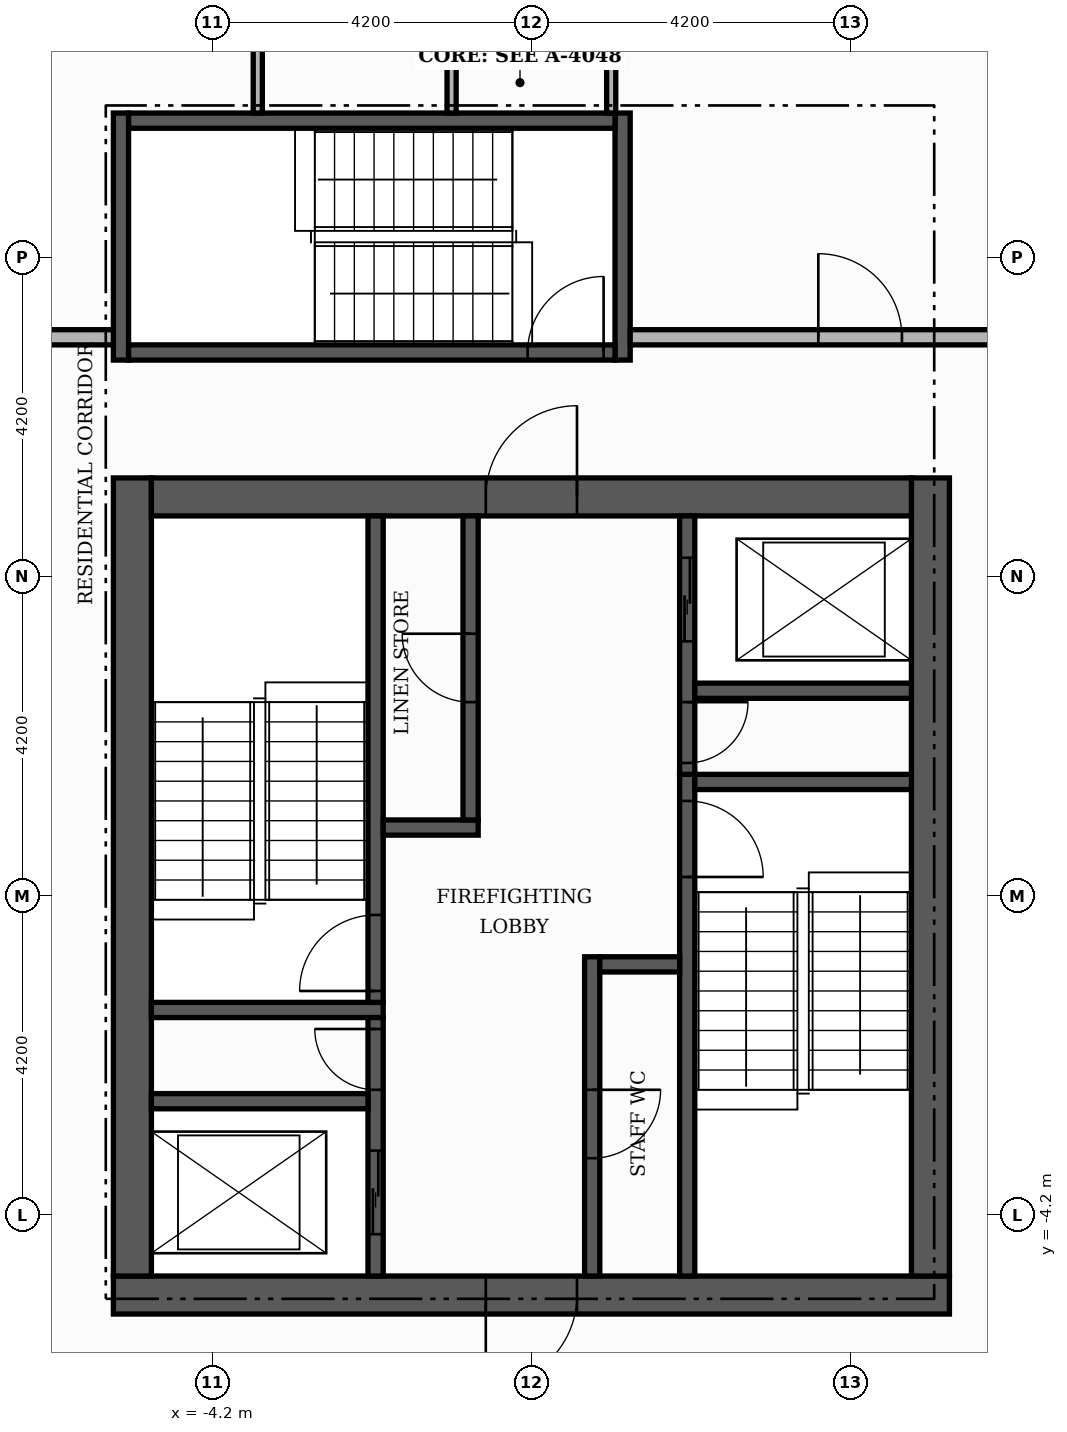
"""IFC4 building model, lengths in metres.
Left out: names, types, materials, properties, quantities, classifications, styles, units other than length and angle.
Written with IfcOpenShell. Run it as: python <this file> out.ifc"""

import sys

from ifc_helpers import new_model, si_unit, direction, frame, frame_2d, origin, place, context, subcontext, project, spatial, rectangle, extrude, element, fill, save


model = new_model("IFC4")
c1 = context("Model", 3, precision=1e-05, world=origin(), true_north=direction((0.0, 1.0)))
c2 = subcontext(c1, "Body", "Model", "MODEL_VIEW")
j1 = project(units=[si_unit("LENGTHUNIT", "METRE"), si_unit("PLANEANGLEUNIT", "RADIAN")], contexts=[c1])
p1 = place(None, origin())
s1 = spatial("IfcSite", under=j1, at=p1, CompositionType="ELEMENT")
p2 = place(p1, origin())
s2 = spatial("IfcBuilding", under=s1, at=p2, CompositionType="ELEMENT")
p3 = place(p2, frame((0.0, 0.0, 296.7)))
s3 = spatial("IfcBuildingStorey", under=s2, at=p3, CompositionType="ELEMENT", Elevation=296.7)
p4 = place(p3, frame((-5.5, -5.25, 0.0), z_axis=(0.0, 0.0, 1.0), x_axis=(1.0, 0.0, 0.0)))
e1 = element("IfcWall", 1, at=p4, inside=s3, PredefinedType="SHEAR", context=c2, shape_type="SweptSolid", body=[
    extrude(rectangle(XDim=11.0, YDim=0.5, at=frame_2d((5.5, 0.0))), origin(), (0.0, 0.0, 1.0), 3.55),
])
p5 = place(p4, frame((4.9, 0.0, 0.0)))
e2 = element("IfcOpeningElement", 2, at=p5, cuts=e1, PredefinedType="OPENING", context=c2, shape_type="SweptSolid", body=[
    extrude(rectangle(XDim=1.2, YDim=2.1, at=frame_2d((0.6, 1.05))), frame((0.0, 0.26, 0.0), z_axis=(0.0, -1.0, 0.0), x_axis=(1.0, 0.0, 0.0)), (0.0, 0.0, 1.0), 0.52),
])
for number, where, z_axis, x_axis in (
    (3, (-5.25, -5.0, 0.0), (0.0, 0.0, 1.0), (0.0, 1.0, 0.0)),
    (4, (5.25, -5.0, 0.0), (0.0, 0.0, 1.0), (0.0, 1.0, 0.0)),
):
    element("IfcWall", number, at=place(p3, frame(where, z_axis=z_axis, x_axis=x_axis)), inside=s3, PredefinedType="SHEAR", context=c2, shape_type="SweptSolid", body=[
        extrude(rectangle(XDim=10.5, YDim=0.5, at=frame_2d((5.25, 0.0))), origin(), (0.0, 0.0, 1.0), 3.55),
    ])
p6 = place(p3, frame((-5.0, 5.25, 0.0), z_axis=(0.0, 0.0, 1.0), x_axis=(1.0, 0.0, 0.0)))
e5 = element("IfcWall", 5, at=p6, inside=s3, PredefinedType="SHEAR", context=c2, shape_type="SweptSolid", body=[
    extrude(rectangle(XDim=10.0, YDim=0.5, at=frame_2d((5.0, 0.0))), origin(), (0.0, 0.0, 1.0), 3.55),
])
p7 = place(p6, frame((4.4, 0.0, 0.0)))
e6 = element("IfcOpeningElement", 6, at=p7, cuts=e5, PredefinedType="OPENING", context=c2, shape_type="SweptSolid", body=[
    extrude(rectangle(XDim=1.2, YDim=2.1, at=frame_2d((0.6, 1.05))), frame((0.0, 0.26, 0.0), z_axis=(0.0, -1.0, 0.0), x_axis=(1.0, 0.0, 0.0)), (0.0, 0.0, 1.0), 0.52),
])
p8 = place(p3, frame((2.05, -5.0, 0.0), z_axis=(0.0, 0.0, 1.0), x_axis=(0.0, 1.0, 0.0)))
e7 = element("IfcWall", 7, at=p8, inside=s3, PredefinedType="SHEAR", context=c2, shape_type="SweptSolid", body=[
    extrude(rectangle(XDim=6.6, YDim=0.2, at=frame_2d((3.3, 0.0))), origin(), (0.0, 0.0, 1.0), 3.55),
])
p9 = place(p8, frame((5.25, 0.0, 0.0)))
e8 = element("IfcOpeningElement", 8, at=p9, cuts=e7, PredefinedType="OPENING", context=c2, shape_type="SweptSolid", body=[
    extrude(rectangle(XDim=1.0, YDim=2.1, at=frame_2d((0.5, 1.05))), frame((0.0, 0.11, 0.0), z_axis=(0.0, -1.0, 0.0), x_axis=(1.0, 0.0, 0.0)), (0.0, 0.0, 1.0), 0.22),
])
p10 = place(p3, frame((-5.0, -1.5, 0.0), z_axis=(0.0, 0.0, 1.0), x_axis=(1.0, 0.0, 0.0)))
e9 = element("IfcWall", 9, at=p10, inside=s3, PredefinedType="SHEAR", context=c2, shape_type="SweptSolid", body=[
    extrude(rectangle(XDim=3.05, YDim=0.2, at=frame_2d((1.525, 0.0))), origin(), (0.0, 0.0, 1.0), 3.55),
])
p11 = place(p3, frame((-2.05, -1.4, 0.0), z_axis=(0.0, 0.0, 1.0), x_axis=(0.0, 1.0, 0.0)))
e10 = element("IfcWall", 10, at=p11, inside=s3, PredefinedType="SHEAR", context=c2, shape_type="SweptSolid", body=[
    extrude(rectangle(XDim=6.4, YDim=0.2, at=frame_2d((3.2, 0.0))), origin(), (0.0, 0.0, 1.0), 3.55),
])
p12 = place(p11, frame((0.15, 0.0, 0.0)))
e11 = element("IfcOpeningElement", 11, at=p12, cuts=e10, PredefinedType="OPENING", context=c2, shape_type="SweptSolid", body=[
    extrude(rectangle(XDim=1.0, YDim=2.1, at=frame_2d((0.5, 1.05))), frame((0.0, 0.11, 0.0), z_axis=(0.0, -1.0, 0.0), x_axis=(1.0, 0.0, 0.0)), (0.0, 0.0, 1.0), 0.22),
])
p13 = place(p3, frame((2.15, 1.5, 0.0), z_axis=(0.0, 0.0, 1.0), x_axis=(1.0, 0.0, 0.0)))
e12 = element("IfcWall", 12, at=p13, inside=s3, PredefinedType="SHEAR", context=c2, shape_type="SweptSolid", body=[
    extrude(rectangle(XDim=2.85, YDim=0.2, at=frame_2d((1.425, 0.0))), origin(), (0.0, 0.0, 1.0), 3.55),
])
p14 = place(p3, frame((-2.05, -5.0, 0.0), z_axis=(0.0, 0.0, 1.0), x_axis=(0.0, 1.0, 0.0)))
e13 = element("IfcWall", 13, at=p14, inside=s3, PredefinedType="SHEAR", context=c2, shape_type="SweptSolid", body=[
    extrude(rectangle(XDim=3.4, YDim=0.2, at=frame_2d((1.7, 0.0))), origin(), (0.0, 0.0, 1.0), 3.55),
])
p15 = place(p14, frame((0.55, 0.0, 0.0)))
e14 = element("IfcOpeningElement", 14, at=p15, cuts=e13, PredefinedType="OPENING", context=c2, shape_type="SweptSolid", body=[
    extrude(rectangle(XDim=1.1, YDim=2.1, at=frame_2d((0.55, 1.05))), frame((0.0, 0.11, 0.0), z_axis=(0.0, -1.0, 0.0), x_axis=(1.0, 0.0, 0.0)), (0.0, 0.0, 1.0), 0.22),
])
p16 = place(p14, frame((2.45, 0.0, 0.0)))
e15 = element("IfcOpeningElement", 15, at=p16, cuts=e13, PredefinedType="OPENING", context=c2, shape_type="SweptSolid", body=[
    extrude(rectangle(XDim=0.8, YDim=2.1, at=frame_2d((0.4, 1.05))), frame((0.0, 0.11, 0.0), z_axis=(0.0, -1.0, 0.0), x_axis=(1.0, 0.0, 0.0)), (0.0, 0.0, 1.0), 0.22),
])
p17 = place(p3, frame((0.8, -5.0, 0.0), z_axis=(0.0, 0.0, 1.0), x_axis=(0.0, 1.0, 0.0)))
e16 = element("IfcWall", 16, at=p17, inside=s3, PredefinedType="SHEAR", context=c2, shape_type="SweptSolid", body=[
    extrude(rectangle(XDim=4.2, YDim=0.2, at=frame_2d((2.1, 0.0))), origin(), (0.0, 0.0, 1.0), 3.55),
])
p18 = place(p17, frame((1.55, 0.0, 0.0)))
e17 = element("IfcOpeningElement", 17, at=p18, cuts=e16, PredefinedType="OPENING", context=c2, shape_type="SweptSolid", body=[
    extrude(rectangle(XDim=0.9, YDim=2.1, at=frame_2d((0.45, 1.05))), frame((0.0, 0.11, 0.0), z_axis=(0.0, -1.0, 0.0), x_axis=(1.0, 0.0, 0.0)), (0.0, 0.0, 1.0), 0.22),
])
p19 = place(p3, frame((-5.0, -2.7, 0.0), z_axis=(0.0, 0.0, 1.0), x_axis=(1.0, 0.0, 0.0)))
e18 = element("IfcWall", 18, at=p19, inside=s3, PredefinedType="SHEAR", context=c2, shape_type="SweptSolid", body=[
    extrude(rectangle(XDim=2.85, YDim=0.2, at=frame_2d((1.425, 0.0))), origin(), (0.0, 0.0, 1.0), 3.55),
])
p20 = place(p3, frame((0.9, -0.9, 0.0), z_axis=(0.0, 0.0, 1.0), x_axis=(1.0, 0.0, 0.0)))
e19 = element("IfcWall", 19, at=p20, inside=s3, PredefinedType="SHEAR", context=c2, shape_type="SweptSolid", body=[
    extrude(rectangle(XDim=1.05, YDim=0.2, at=frame_2d((0.525, 0.0))), origin(), (0.0, 0.0, 1.0), 3.55),
])
p21 = place(p3, frame((-1.95, 0.9, 0.0), z_axis=(0.0, 0.0, 1.0), x_axis=(1.0, 0.0, 0.0)))
e20 = element("IfcWall", 20, at=p21, inside=s3, PredefinedType="SHEAR", context=c2, shape_type="SweptSolid", body=[
    extrude(rectangle(XDim=1.25, YDim=0.2, at=frame_2d((0.625, 0.0))), origin(), (0.0, 0.0, 1.0), 3.55),
])
p22 = place(p3, frame((-0.8, 1.0, 0.0), z_axis=(0.0, 0.0, 1.0), x_axis=(0.0, 1.0, 0.0)))
e21 = element("IfcWall", 21, at=p22, inside=s3, PredefinedType="SHEAR", context=c2, shape_type="SweptSolid", body=[
    extrude(rectangle(XDim=4.0, YDim=0.2, at=frame_2d((2.0, 0.0))), origin(), (0.0, 0.0, 1.0), 3.55),
])
p23 = place(p22, frame((1.55, 0.0, 0.0)))
e22 = element("IfcOpeningElement", 22, at=p23, cuts=e21, PredefinedType="OPENING", context=c2, shape_type="SweptSolid", body=[
    extrude(rectangle(XDim=0.9, YDim=2.1, at=frame_2d((0.45, 1.05))), frame((0.0, 0.11, 0.0), z_axis=(0.0, -1.0, 0.0), x_axis=(1.0, 0.0, 0.0)), (0.0, 0.0, 1.0), 0.22),
])
p24 = place(p3, frame((2.05, 1.6, 0.0), z_axis=(0.0, 0.0, 1.0), x_axis=(0.0, 1.0, 0.0)))
e23 = element("IfcWall", 23, at=p24, inside=s3, PredefinedType="SHEAR", context=c2, shape_type="SweptSolid", body=[
    extrude(rectangle(XDim=3.4, YDim=0.2, at=frame_2d((1.7, 0.0))), origin(), (0.0, 0.0, 1.0), 3.55),
])
p25 = place(p24, frame((1.75, 0.0, 0.0)))
e24 = element("IfcOpeningElement", 24, at=p25, cuts=e23, PredefinedType="OPENING", context=c2, shape_type="SweptSolid", body=[
    extrude(rectangle(XDim=1.1, YDim=2.1, at=frame_2d((0.55, 1.05))), frame((0.0, 0.11, 0.0), z_axis=(0.0, -1.0, 0.0), x_axis=(1.0, 0.0, 0.0)), (0.0, 0.0, 1.0), 0.22),
])
p26 = place(p24, frame((0.15, 0.0, 0.0)))
e25 = element("IfcOpeningElement", 25, at=p26, cuts=e23, PredefinedType="OPENING", context=c2, shape_type="SweptSolid", body=[
    extrude(rectangle(XDim=0.8, YDim=2.1, at=frame_2d((0.4, 1.05))), frame((0.0, 0.11, 0.0), z_axis=(0.0, -1.0, 0.0), x_axis=(1.0, 0.0, 0.0)), (0.0, 0.0, 1.0), 0.22),
])
p27 = place(p3, frame((2.15, 2.7, 0.0), z_axis=(0.0, 0.0, 1.0), x_axis=(1.0, 0.0, 0.0)))
e26 = element("IfcWall", 26, at=p27, inside=s3, PredefinedType="SHEAR", context=c2, shape_type="SweptSolid", body=[
    extrude(rectangle(XDim=2.85, YDim=0.2, at=frame_2d((1.425, 0.0))), origin(), (0.0, 0.0, 1.0), 3.55),
])
for number, where, z_axis, x_axis in (
    (27, (-5.4, 7.05, 0.0), (0.0, 0.0, 1.0), (0.0, 1.0, 0.0)),
    (28, (1.2, 7.05, 0.0), (0.0, 0.0, 1.0), (0.0, 1.0, 0.0)),
):
    element("IfcWall", number, at=place(p3, frame(where, z_axis=z_axis, x_axis=x_axis)), inside=s3, PredefinedType="SHEAR", context=c2, shape_type="SweptSolid", body=[
        extrude(rectangle(XDim=3.25, YDim=0.2, at=frame_2d((1.625, 0.0))), origin(), (0.0, 0.0, 1.0), 3.55),
    ])
p28 = place(p3, frame((-5.3, 7.15, 0.0), z_axis=(0.0, 0.0, 1.0), x_axis=(1.0, 0.0, 0.0)))
e29 = element("IfcWall", 29, at=p28, inside=s3, PredefinedType="SHEAR", context=c2, shape_type="SweptSolid", body=[
    extrude(rectangle(XDim=6.4, YDim=0.2, at=frame_2d((3.2, 0.0))), origin(), (0.0, 0.0, 1.0), 3.55),
])
p29 = place(p28, frame((5.25, 0.0, 0.0)))
e30 = element("IfcOpeningElement", 30, at=p29, cuts=e29, PredefinedType="OPENING", context=c2, shape_type="SweptSolid", body=[
    extrude(rectangle(XDim=1.0, YDim=2.1, at=frame_2d((0.5, 1.05))), frame((0.0, 0.11, 0.0), z_axis=(0.0, -1.0, 0.0), x_axis=(1.0, 0.0, 0.0)), (0.0, 0.0, 1.0), 0.22),
])
p30 = place(p3, frame((-5.3, 10.2, 0.0), z_axis=(0.0, 0.0, 1.0), x_axis=(1.0, 0.0, 0.0)))
e31 = element("IfcWall", 31, at=p30, inside=s3, PredefinedType="SHEAR", context=c2, shape_type="SweptSolid", body=[
    extrude(rectangle(XDim=6.4, YDim=0.2, at=frame_2d((3.2, 0.0))), origin(), (0.0, 0.0, 1.0), 3.55),
])
p31 = place(p3, frame((-7.35, 7.35, 0.0), z_axis=(0.0, 0.0, 1.0), x_axis=(1.0, 0.0, 0.0)))
e32 = element("IfcWall", 32, at=p31, inside=s3, PredefinedType="PARTITIONING", context=c2, shape_type="SweptSolid", body=[
    extrude(rectangle(XDim=1.85, YDim=0.2, at=frame_2d((0.925, 0.0))), origin(), (0.0, 0.0, 1.0), 3.55),
])
p32 = place(p3, frame((1.3, 7.35, 0.0), z_axis=(0.0, 0.0, 1.0), x_axis=(1.0, 0.0, 0.0)))
e33 = element("IfcWall", 33, at=p32, inside=s3, PredefinedType="PARTITIONING", context=c2, shape_type="SweptSolid", body=[
    extrude(rectangle(XDim=20.0, YDim=0.2, at=frame_2d((10.0, 0.0))), origin(), (0.0, 0.0, 1.0), 3.55),
])
p33 = place(p32, frame((2.475, 0.0, 0.0)))
e34 = element("IfcOpeningElement", 34, at=p33, cuts=e33, PredefinedType="OPENING", context=c2, shape_type="SweptSolid", body=[
    extrude(rectangle(XDim=1.1, YDim=2.4, at=frame_2d((0.55, 1.2))), frame((0.0, 0.11, 0.0), z_axis=(0.0, -1.0, 0.0), x_axis=(1.0, 0.0, 0.0)), (0.0, 0.0, 1.0), 0.22),
])
for number, where, z_axis, x_axis in (
    (35, (-3.6, 10.3, 0.0), (0.0, 0.0, 1.0), (0.0, 1.0, 0.0)),
    (36, (-1.05, 10.3, 0.0), (0.0, 0.0, 1.0), (0.0, 1.0, 0.0)),
):
    element("IfcWall", number, at=place(p3, frame(where, z_axis=z_axis, x_axis=x_axis)), inside=s3, PredefinedType="PARTITIONING", context=c2, shape_type="SweptSolid", body=[
        extrude(rectangle(XDim=4.14, YDim=0.12, at=frame_2d((2.07, 0.0))), origin(), (0.0, 0.0, 1.0), 3.55),
    ])
p34 = place(p3, frame((1.05, 10.3, 0.0), z_axis=(0.0, 0.0, 1.0), x_axis=(0.0, 1.0, 0.0)))
e37 = element("IfcWall", 37, at=p34, inside=s3, PredefinedType="PARTITIONING", context=c2, shape_type="SweptSolid", body=[
    extrude(rectangle(XDim=4.14, YDim=0.12, at=frame_2d((2.07, 0.0))), origin(), (0.0, 0.0, 1.0), 3.55),
])
p35 = place(p34, frame((1.65, 0.0, 0.0)))
e38 = element("IfcOpeningElement", 38, at=p35, cuts=e37, PredefinedType="OPENING", context=c2, shape_type="SweptSolid", body=[
    extrude(rectangle(XDim=0.9, YDim=2.1, at=frame_2d((0.45, 1.05))), frame((0.0, 0.07, 0.0), z_axis=(0.0, -1.0, 0.0), x_axis=(1.0, 0.0, 0.0)), (0.0, 0.0, 1.0), 0.14),
])
p36 = place(p25, origin())
e39 = element("IfcDoor", 39, at=p36, inside=s3, OperationType="SLIDING_TO_LEFT", PredefinedType="DOOR", context=c2, shape_type="SweptSolid", body=[
    extrude(rectangle(XDim=1.1, YDim=2.1, at=frame_2d((0.55, 1.05))), frame((0.0, 0.025, 0.0), z_axis=(0.0, -1.0, 0.0), x_axis=(1.0, 0.0, 0.0)), (0.0, 0.0, 1.0), 0.05),
])
fill(e24, e39)
p37 = place(p15, origin())
e40 = element("IfcDoor", 40, at=p37, inside=s3, OperationType="SLIDING_TO_LEFT", PredefinedType="DOOR", context=c2, shape_type="SweptSolid", body=[
    extrude(rectangle(XDim=1.1, YDim=2.1, at=frame_2d((0.55, 1.05))), frame((0.0, 0.025, 0.0), z_axis=(0.0, -1.0, 0.0), x_axis=(1.0, 0.0, 0.0)), (0.0, 0.0, 1.0), 0.05),
])
fill(e14, e40)
p38 = place(p12, origin())
e41 = element("IfcDoor", 41, at=p38, inside=s3, OperationType="SINGLE_SWING_LEFT", PredefinedType="DOOR", context=c2, shape_type="SweptSolid", body=[
    extrude(rectangle(XDim=1.0, YDim=2.1, at=frame_2d((0.5, 1.05))), frame((0.0, 0.025, 0.0), z_axis=(0.0, -1.0, 0.0), x_axis=(1.0, 0.0, 0.0)), (0.0, 0.0, 1.0), 0.05),
])
fill(e11, e41)
p39 = place(p9, frame((1.0, 0.0, 0.0), z_axis=(0.0, 0.0, 1.0), x_axis=(-1.0, 0.0, 0.0)))
e42 = element("IfcDoor", 42, at=p39, inside=s3, OperationType="SINGLE_SWING_LEFT", PredefinedType="DOOR", context=c2, shape_type="SweptSolid", body=[
    extrude(rectangle(XDim=1.0, YDim=2.1, at=frame_2d((0.5, 1.05))), frame((0.0, 0.025, 0.0), z_axis=(0.0, -1.0, 0.0), x_axis=(1.0, 0.0, 0.0)), (0.0, 0.0, 1.0), 0.05),
])
fill(e8, e42)
p40 = place(p26, frame((0.8, 0.0, 0.0), z_axis=(0.0, 0.0, 1.0), x_axis=(-1.0, 0.0, 0.0)))
e43 = element("IfcDoor", 43, at=p40, inside=s3, OperationType="SINGLE_SWING_RIGHT", PredefinedType="DOOR", context=c2, shape_type="SweptSolid", body=[
    extrude(rectangle(XDim=0.8, YDim=2.1, at=frame_2d((0.4, 1.05))), frame((0.0, 0.025, 0.0), z_axis=(0.0, -1.0, 0.0), x_axis=(1.0, 0.0, 0.0)), (0.0, 0.0, 1.0), 0.05),
])
fill(e25, e43)
p41 = place(p16, origin())
e44 = element("IfcDoor", 44, at=p41, inside=s3, OperationType="SINGLE_SWING_RIGHT", PredefinedType="DOOR", context=c2, shape_type="SweptSolid", body=[
    extrude(rectangle(XDim=0.8, YDim=2.1, at=frame_2d((0.4, 1.05))), frame((0.0, 0.025, 0.0), z_axis=(0.0, -1.0, 0.0), x_axis=(1.0, 0.0, 0.0)), (0.0, 0.0, 1.0), 0.05),
])
fill(e15, e44)
p42 = place(p29, origin())
e45 = element("IfcDoor", 45, at=p42, inside=s3, OperationType="SINGLE_SWING_RIGHT", PredefinedType="DOOR", context=c2, shape_type="SweptSolid", body=[
    extrude(rectangle(XDim=1.0, YDim=2.1, at=frame_2d((0.5, 1.05))), frame((0.0, 0.025, 0.0), z_axis=(0.0, -1.0, 0.0), x_axis=(1.0, 0.0, 0.0)), (0.0, 0.0, 1.0), 0.05),
])
fill(e30, e45)
p43 = place(p23, origin())
e46 = element("IfcDoor", 46, at=p43, inside=s3, OperationType="SINGLE_SWING_RIGHT", PredefinedType="DOOR", context=c2, shape_type="SweptSolid", body=[
    extrude(rectangle(XDim=0.9, YDim=2.1, at=frame_2d((0.45, 1.05))), frame((0.0, 0.025, 0.0), z_axis=(0.0, -1.0, 0.0), x_axis=(1.0, 0.0, 0.0)), (0.0, 0.0, 1.0), 0.05),
])
fill(e22, e46)
p44 = place(p18, frame((0.9, 0.0, 0.0), z_axis=(0.0, 0.0, 1.0), x_axis=(-1.0, 0.0, 0.0)))
e47 = element("IfcDoor", 47, at=p44, inside=s3, OperationType="SINGLE_SWING_RIGHT", PredefinedType="DOOR", context=c2, shape_type="SweptSolid", body=[
    extrude(rectangle(XDim=0.9, YDim=2.1, at=frame_2d((0.45, 1.05))), frame((0.0, 0.025, 0.0), z_axis=(0.0, -1.0, 0.0), x_axis=(1.0, 0.0, 0.0)), (0.0, 0.0, 1.0), 0.05),
])
fill(e17, e47)
p45 = place(p7, origin())
e48 = element("IfcDoor", 48, at=p45, inside=s3, OperationType="SINGLE_SWING_RIGHT", PredefinedType="DOOR", context=c2, shape_type="SweptSolid", body=[
    extrude(rectangle(XDim=1.2, YDim=2.1, at=frame_2d((0.6, 1.05))), frame((0.0, 0.025, 0.0), z_axis=(0.0, -1.0, 0.0), x_axis=(1.0, 0.0, 0.0)), (0.0, 0.0, 1.0), 0.05),
])
fill(e6, e48)
p46 = place(p5, frame((1.2, 0.0, 0.0), z_axis=(0.0, 0.0, 1.0), x_axis=(-1.0, 0.0, 0.0)))
e49 = element("IfcDoor", 49, at=p46, inside=s3, OperationType="SINGLE_SWING_LEFT", PredefinedType="DOOR", context=c2, shape_type="SweptSolid", body=[
    extrude(rectangle(XDim=1.2, YDim=2.1, at=frame_2d((0.6, 1.05))), frame((0.0, 0.025, 0.0), z_axis=(0.0, -1.0, 0.0), x_axis=(1.0, 0.0, 0.0)), (0.0, 0.0, 1.0), 0.05),
])
fill(e2, e49)
p47 = place(p33, origin())
e50 = element("IfcDoor", 50, at=p47, inside=s3, OperationType="SINGLE_SWING_LEFT", PredefinedType="DOOR", context=c2, shape_type="SweptSolid", body=[
    extrude(rectangle(XDim=1.1, YDim=2.4, at=frame_2d((0.55, 1.2))), frame((0.0, 0.025, 0.0), z_axis=(0.0, -1.0, 0.0), x_axis=(1.0, 0.0, 0.0)), (0.0, 0.0, 1.0), 0.05),
])
fill(e34, e50)
save(model, sys.argv[1])
